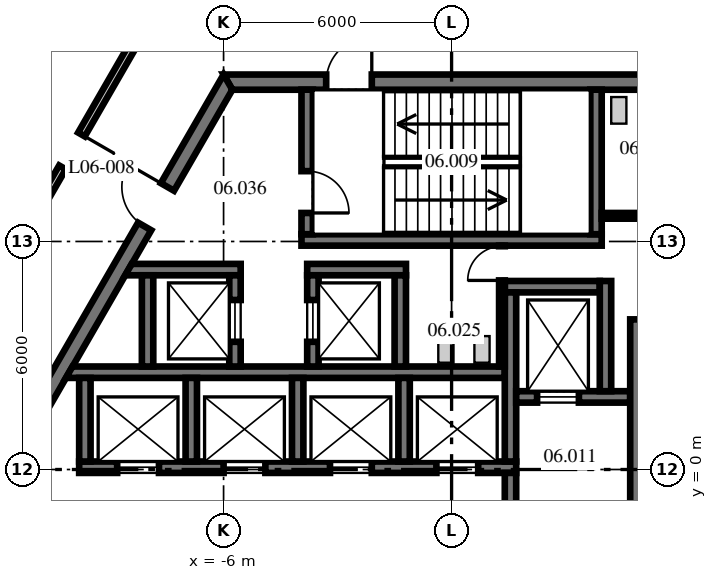
"""IFC4 building model, lengths in metres.
Left out: names, types, materials, properties, quantities, classifications, styles, units other than length and angle.
Written with IfcOpenShell. Run it as: python <this file> out.ifc"""

import sys

from ifc_helpers import new_model, si_unit, direction, frame, frame_2d, origin, place, context, subcontext, project, spatial, polyline, rectangle, outline, extrude, source, transform, mapped, element, fill, save


model = new_model("IFC4")
c1 = context("Model", 3, precision=1e-05, world=origin(), true_north=direction((0.0, 1.0)))
c2 = subcontext(c1, "Body", "Model", "MODEL_VIEW")
j1 = project(units=[si_unit("LENGTHUNIT", "METRE"), si_unit("PLANEANGLEUNIT", "RADIAN")], contexts=[c1])
p1 = place(None, origin())
s1 = spatial("IfcSite", under=j1, at=p1, CompositionType="ELEMENT")
p2 = place(p1, origin())
s2 = spatial("IfcBuilding", under=s1, at=p2, CompositionType="ELEMENT")
p3 = place(p2, frame((0.0, 0.0, 28.9)))
s3 = spatial("IfcBuildingStorey", under=s2, at=p3, CompositionType="ELEMENT", Elevation=28.9)
m1 = source(origin(), c2, "Body", "SweptSolid", [
    extrude(outline(polyline([(-0.115, -0.2), (11.885, -0.2), (11.654, 0.2), (0.115, 0.2), (-0.115, -0.2)])), origin(), (0.0, 0.0, 1.0), 4.1),
])
p4 = place(p3, frame((5.885, 10.192, 0.0), z_axis=(0.0, 0.0, 1.0), x_axis=(-1.0, 0.0, 0.0)))
e1 = element("IfcWall", 1, at=p4, inside=s3, PredefinedType="SHEAR", context=c2, shape_type="MappedRepresentation", body=[
    mapped(m1, transform((0.0, 0.0, 0.0), scale=1.0)),
])
p5 = place(p4, frame((7.985, 0.0, 0.0)))
e2 = element("IfcOpeningElement", 2, at=p5, cuts=e1, PredefinedType="OPENING", context=c2, shape_type="SweptSolid", body=[
    extrude(rectangle(XDim=1.2, YDim=2.1, at=frame_2d((0.6, 1.05))), frame((0.0, 0.21, 0.0), z_axis=(0.0, -1.0, 0.0), x_axis=(1.0, 0.0, 0.0)), (0.0, 0.0, 1.0), 0.42),
])
p6 = place(p3, frame((-5.885, 10.192, 0.0), z_axis=(0.0, 0.0, 1.0), x_axis=(-0.499996592174, -0.866027371285, 0.0)))
e3 = element("IfcWall", 3, at=p6, inside=s3, PredefinedType="SHEAR", context=c2, shape_type="MappedRepresentation", body=[
    mapped(m1, transform((0.0, 0.0, 0.0), scale=1.0)),
])
p7 = place(p6, frame((3.185, 0.0, 0.0)))
e4 = element("IfcOpeningElement", 4, at=p7, cuts=e3, PredefinedType="OPENING", context=c2, shape_type="SweptSolid", body=[
    extrude(rectangle(XDim=1.2, YDim=2.1, at=frame_2d((0.6, 1.05))), frame((0.0, 0.21, 0.0), z_axis=(0.0, -1.0, 0.0), x_axis=(1.0, 0.0, 0.0)), (0.0, 0.0, 1.0), 0.42),
])
p8 = place(p3, frame((-11.769, 0.0, 0.0), z_axis=(0.0, 0.0, 1.0), x_axis=(0.499996592174, -0.866027371285, 0.0)))
e5 = element("IfcWall", 5, at=p8, inside=s3, PredefinedType="SHEAR", context=c2, shape_type="MappedRepresentation", body=[
    mapped(m1, transform((0.0, 0.0, 0.0), scale=1.0)),
])
p9 = place(p8, frame((1.405, 0.0, 0.0)))
e6 = element("IfcOpeningElement", 6, at=p9, cuts=e5, PredefinedType="OPENING", context=c2, shape_type="SweptSolid", body=[
    extrude(rectangle(XDim=1.8, YDim=2.1, at=frame_2d((0.9, 1.05))), frame((0.0, 0.21, 0.0), z_axis=(0.0, -1.0, 0.0), x_axis=(1.0, 0.0, 0.0)), (0.0, 0.0, 1.0), 0.42),
])
p10 = place(p8, frame((7.915, 0.0, 0.0)))
e7 = element("IfcOpeningElement", 7, at=p10, cuts=e5, PredefinedType="OPENING", context=c2, shape_type="SweptSolid", body=[
    extrude(rectangle(XDim=1.2, YDim=2.1, at=frame_2d((0.6, 1.05))), frame((0.0, 0.21, 0.0), z_axis=(0.0, -1.0, 0.0), x_axis=(1.0, 0.0, 0.0)), (0.0, 0.0, 1.0), 0.42),
])
m2 = source(origin(), c2, "Body", "SweptSolid", [
    extrude(rectangle(XDim=11.5, YDim=0.3, at=frame_2d((5.75, 0.0))), origin(), (0.0, 0.0, 1.0), 4.1),
])
p11 = place(p3, frame((-9.8, 0.06, 0.0), z_axis=(0.0, 0.0, 1.0), x_axis=(1.0, 0.0, 0.0)))
e8 = element("IfcWall", 8, at=p11, inside=s3, PredefinedType="SHEAR", context=c2, shape_type="MappedRepresentation", body=[
    mapped(m2, transform((0.0, 0.0, 0.0), scale=1.0)),
])
p12 = place(p11, frame((1.0, 0.0, 0.0)))
e9 = element("IfcOpeningElement", 9, at=p12, cuts=e8, PredefinedType="OPENING", context=c2, shape_type="SweptSolid", body=[
    extrude(rectangle(XDim=1.1, YDim=2.1, at=frame_2d((0.55, 1.05))), frame((0.0, 0.16, 0.0), z_axis=(0.0, -1.0, 0.0), x_axis=(1.0, 0.0, 0.0)), (0.0, 0.0, 1.0), 0.32),
])
p13 = place(p11, frame((3.8, 0.0, 0.0)))
e10 = element("IfcOpeningElement", 10, at=p13, cuts=e8, PredefinedType="OPENING", context=c2, shape_type="SweptSolid", body=[
    extrude(rectangle(XDim=1.1, YDim=2.1, at=frame_2d((0.55, 1.05))), frame((0.0, 0.16, 0.0), z_axis=(0.0, -1.0, 0.0), x_axis=(1.0, 0.0, 0.0)), (0.0, 0.0, 1.0), 0.32),
])
p14 = place(p11, frame((6.6, 0.0, 0.0)))
e11 = element("IfcOpeningElement", 11, at=p14, cuts=e8, PredefinedType="OPENING", context=c2, shape_type="SweptSolid", body=[
    extrude(rectangle(XDim=1.1, YDim=2.1, at=frame_2d((0.55, 1.05))), frame((0.0, 0.16, 0.0), z_axis=(0.0, -1.0, 0.0), x_axis=(1.0, 0.0, 0.0)), (0.0, 0.0, 1.0), 0.32),
])
p15 = place(p11, frame((9.4, 0.0, 0.0)))
e12 = element("IfcOpeningElement", 12, at=p15, cuts=e8, PredefinedType="OPENING", context=c2, shape_type="SweptSolid", body=[
    extrude(rectangle(XDim=1.1, YDim=2.1, at=frame_2d((0.55, 1.05))), frame((0.0, 0.16, 0.0), z_axis=(0.0, -1.0, 0.0), x_axis=(1.0, 0.0, 0.0)), (0.0, 0.0, 1.0), 0.32),
])
m3 = source(origin(), c2, "Body", "SweptSolid", [
    extrude(outline(polyline([(11.2, -0.15), (-0.349, -0.15), (-0.176, 0.15), (11.2, 0.15), (11.2, -0.15)])), origin(), (0.0, 0.0, 1.0), 4.1),
])
p16 = place(p3, frame((-9.8, 2.56, 0.0), z_axis=(0.0, 0.0, 1.0), x_axis=(1.0, 0.0, 0.0)))
e13 = element("IfcWall", 13, at=p16, inside=s3, PredefinedType="SHEAR", context=c2, shape_type="MappedRepresentation", body=[
    mapped(m3, transform((0.0, 0.0, 0.0), scale=1.0)),
])
m4 = source(origin(), c2, "Body", "SweptSolid", [
    extrude(rectangle(XDim=2.5, YDim=0.3, at=frame_2d((1.25, 0.0))), origin(), (0.0, 0.0, 1.0), 4.1),
])
p17 = place(p3, frame((1.4, 4.81, 0.0), z_axis=(0.0, 0.0, 1.0), x_axis=(1.0, 0.0, 0.0)))
e14 = element("IfcWall", 14, at=p17, inside=s3, PredefinedType="SHEAR", context=c2, shape_type="MappedRepresentation", body=[
    mapped(m4, transform((0.0, 0.0, 0.0), scale=1.0)),
])
m5 = source(origin(), c2, "Body", "SweptSolid", [
    extrude(rectangle(XDim=4.45, YDim=0.3, at=frame_2d((2.225, 0.0))), origin(), (0.0, 0.0, 1.0), 4.1),
])
p18 = place(p3, frame((1.55, 0.21, 0.0), z_axis=(0.0, 0.0, 1.0), x_axis=(0.0, 1.0, 0.0)))
e15 = element("IfcWall", 15, at=p18, inside=s3, PredefinedType="SHEAR", context=c2, shape_type="MappedRepresentation", body=[
    mapped(m5, transform((0.0, 0.0, 0.0), scale=1.0)),
])
m6 = source(origin(), c2, "Body", "SweptSolid", [
    extrude(rectangle(XDim=3.0, YDim=0.3, at=frame_2d((1.5, 0.0))), origin(), (0.0, 0.0, 1.0), 4.1),
])
p19 = place(p3, frame((1.7, 1.91, 0.0), z_axis=(0.0, 0.0, 1.0), x_axis=(1.0, 0.0, 0.0)))
e16 = element("IfcWall", 16, at=p19, inside=s3, PredefinedType="SHEAR", context=c2, shape_type="MappedRepresentation", body=[
    mapped(m6, transform((0.0, 0.0, 0.0), scale=1.0)),
])
p20 = place(p19, frame((0.55, 0.0, 0.0)))
e17 = element("IfcOpeningElement", 17, at=p20, cuts=e16, PredefinedType="OPENING", context=c2, shape_type="SweptSolid", body=[
    extrude(rectangle(XDim=1.1, YDim=2.1, at=frame_2d((0.55, 1.05))), frame((0.0, 0.16, 0.0), z_axis=(0.0, -1.0, 0.0), x_axis=(1.0, 0.0, 0.0)), (0.0, 0.0, 1.0), 0.32),
])
m7 = source(origin(), c2, "Body", "SweptSolid", [
    extrude(rectangle(XDim=2.9, YDim=0.3, at=frame_2d((1.45, 0.0))), origin(), (0.0, 0.0, 1.0), 4.1),
])
p21 = place(p3, frame((4.05, 2.06, 0.0), z_axis=(0.0, 0.0, 1.0), x_axis=(0.0, 1.0, 0.0)))
e18 = element("IfcWall", 18, at=p21, inside=s3, PredefinedType="SHEAR", context=c2, shape_type="MappedRepresentation", body=[
    mapped(m7, transform((0.0, 0.0, 0.0), scale=1.0)),
])
m8 = source(origin(), c2, "Body", "SweptSolid", [
    extrude(rectangle(XDim=2.2, YDim=0.3, at=frame_2d((1.1, 0.0))), origin(), (0.0, 0.0, 1.0), 4.1),
])
p22 = place(p3, frame((-9.65, 0.21, 0.0), z_axis=(0.0, 0.0, 1.0), x_axis=(0.0, 1.0, 0.0)))
e19 = element("IfcWall", 19, at=p22, inside=s3, PredefinedType="SHEAR", context=c2, shape_type="MappedRepresentation", body=[
    mapped(m8, transform((0.0, 0.0, 0.0), scale=1.0)),
])
p23 = place(p3, frame((1.55, -3.09, 0.0), z_axis=(0.0, 0.0, 1.0), x_axis=(0.0, 1.0, 0.0)))
e20 = element("IfcWall", 20, at=p23, inside=s3, PredefinedType="SHEAR", context=c2, shape_type="MappedRepresentation", body=[
    mapped(m6, transform((0.0, 0.0, 0.0), scale=1.0)),
])
p24 = place(p23, frame((0.9, 0.0, 0.0)))
e21 = element("IfcOpeningElement", 21, at=p24, cuts=e20, PredefinedType="OPENING", context=c2, shape_type="SweptSolid", body=[
    extrude(rectangle(XDim=1.2, YDim=2.1, at=frame_2d((0.6, 1.05))), frame((0.0, 0.16, 0.0), z_axis=(0.0, -1.0, 0.0), x_axis=(1.0, 0.0, 0.0)), (0.0, 0.0, 1.0), 0.32),
])
m9 = source(origin(), c2, "Body", "SweptSolid", [
    extrude(outline(polyline([(-0.15, -0.15), (9.99, -0.15), (9.99, 0.15), (0.15, 0.15), (-0.15, -0.15)])), origin(), (0.0, 0.0, 1.0), 4.1),
])
p25 = place(p3, frame((4.85, -6.04, 0.0), z_axis=(0.0, 0.0, 1.0), x_axis=(0.0, 1.0, 0.0)))
e22 = element("IfcWall", 22, at=p25, inside=s3, PredefinedType="SHEAR", context=c2, shape_type="MappedRepresentation", body=[
    mapped(m9, transform((0.0, 0.0, 0.0), scale=1.0)),
])
p26 = place(p25, frame((3.19, 0.0, 0.0)))
e23 = element("IfcOpeningElement", 23, at=p26, cuts=e22, PredefinedType="OPENING", context=c2, shape_type="SweptSolid", body=[
    extrude(rectangle(XDim=1.1, YDim=2.1, at=frame_2d((0.55, 1.05))), frame((0.0, 0.16, 0.0), z_axis=(0.0, -1.0, 0.0), x_axis=(1.0, 0.0, 0.0)), (0.0, 0.0, 1.0), 0.32),
])
m10 = source(origin(), c2, "Body", "SweptSolid", [
    extrude(rectangle(XDim=7.9, YDim=0.3, at=frame_2d((3.95, 0.0))), origin(), (0.0, 0.0, 1.0), 4.1),
])
p27 = place(p3, frame((-3.95, 6.04, 0.0), z_axis=(0.0, 0.0, 1.0), x_axis=(1.0, 0.0, 0.0)))
e24 = element("IfcWall", 24, at=p27, inside=s3, PredefinedType="SHEAR", context=c2, shape_type="MappedRepresentation", body=[
    mapped(m10, transform((0.0, 0.0, 0.0), scale=1.0)),
])
m11 = source(origin(), c2, "Body", "SweptSolid", [
    extrude(outline(polyline([(0.0, -0.15), (0.0, 0.15), (3.804, 0.15), (3.804, -0.15), (0.0, -0.15)])), origin(), (0.0, 0.0, 1.0), 4.1),
])
p28 = place(p3, frame((-3.8, 6.19, 0.0), z_axis=(0.0, 0.0, 1.0), x_axis=(0.0, 1.0, 0.0)))
e25 = element("IfcWall", 25, at=p28, inside=s3, PredefinedType="SHEAR", context=c2, shape_type="MappedRepresentation", body=[
    mapped(m11, transform((0.0, 0.0, 0.0), scale=1.0)),
])
p29 = place(p28, frame((0.56, 0.0, 0.0)))
e26 = element("IfcOpeningElement", 26, at=p29, cuts=e25, PredefinedType="OPENING", context=c2, shape_type="SweptSolid", body=[
    extrude(rectangle(XDim=1.1, YDim=2.1, at=frame_2d((0.55, 1.05))), frame((0.0, 0.16, 0.0), z_axis=(0.0, -1.0, 0.0), x_axis=(1.0, 0.0, 0.0)), (0.0, 0.0, 1.0), 0.32),
])
p30 = place(p3, frame((3.8, 6.19, 0.0), z_axis=(0.0, 0.0, 1.0), x_axis=(0.0, 1.0, 0.0)))
e27 = element("IfcWall", 27, at=p30, inside=s3, PredefinedType="SHEAR", context=c2, shape_type="MappedRepresentation", body=[
    mapped(m11, transform((0.0, 0.0, 0.0), scale=1.0)),
])
m12 = source(origin(), c2, "Body", "SweptSolid", [
    extrude(outline(polyline([(2.6, -0.15), (-0.44, -0.15), (-0.267, 0.15), (2.6, 0.15), (2.6, -0.15)])), origin(), (0.0, 0.0, 1.0), 4.1),
])
p31 = place(p3, frame((-8.15, 5.26, 0.0), z_axis=(0.0, 0.0, 1.0), x_axis=(1.0, 0.0, 0.0)))
e28 = element("IfcWall", 28, at=p31, inside=s3, PredefinedType="SHEAR", context=c2, shape_type="MappedRepresentation", body=[
    mapped(m12, transform((0.0, 0.0, 0.0), scale=1.0)),
])
m13 = source(origin(), c2, "Body", "SweptSolid", [
    extrude(rectangle(XDim=2.4, YDim=0.3, at=frame_2d((1.2, 0.0))), origin(), (0.0, 0.0, 1.0), 4.1),
])
p32 = place(p3, frame((-8.0, 2.71, 0.0), z_axis=(0.0, 0.0, 1.0), x_axis=(0.0, 1.0, 0.0)))
e29 = element("IfcWall", 29, at=p32, inside=s3, PredefinedType="SHEAR", context=c2, shape_type="MappedRepresentation", body=[
    mapped(m13, transform((0.0, 0.0, 0.0), scale=1.0)),
])
p33 = place(p3, frame((-5.7, 2.71, 0.0), z_axis=(0.0, 0.0, 1.0), x_axis=(0.0, 1.0, 0.0)))
e30 = element("IfcWall", 30, at=p33, inside=s3, PredefinedType="SHEAR", context=c2, shape_type="MappedRepresentation", body=[
    mapped(m13, transform((0.0, 0.0, 0.0), scale=1.0)),
])
p34 = place(p33, frame((0.65, 0.0, 0.0)))
e31 = element("IfcOpeningElement", 31, at=p34, cuts=e30, PredefinedType="OPENING", context=c2, shape_type="SweptSolid", body=[
    extrude(rectangle(XDim=1.1, YDim=2.1, at=frame_2d((0.55, 1.05))), frame((0.0, 0.16, 0.0), z_axis=(0.0, -1.0, 0.0), x_axis=(1.0, 0.0, 0.0)), (0.0, 0.0, 1.0), 0.32),
])
m14 = source(origin(), c2, "Body", "SweptSolid", [
    extrude(rectangle(XDim=2.6, YDim=0.3, at=frame_2d((1.3, 0.0))), origin(), (0.0, 0.0, 1.0), 4.1),
])
p35 = place(p3, frame((-3.8, 5.26, 0.0), z_axis=(0.0, 0.0, 1.0), x_axis=(1.0, 0.0, 0.0)))
e32 = element("IfcWall", 32, at=p35, inside=s3, PredefinedType="SHEAR", context=c2, shape_type="MappedRepresentation", body=[
    mapped(m14, transform((0.0, 0.0, 0.0), scale=1.0)),
])
p36 = place(p3, frame((-3.65, 2.71, 0.0), z_axis=(0.0, 0.0, 1.0), x_axis=(0.0, 1.0, 0.0)))
e33 = element("IfcWall", 33, at=p36, inside=s3, PredefinedType="SHEAR", context=c2, shape_type="MappedRepresentation", body=[
    mapped(m13, transform((0.0, 0.0, 0.0), scale=1.0)),
])
p37 = place(p36, frame((0.65, 0.0, 0.0)))
e34 = element("IfcOpeningElement", 34, at=p37, cuts=e33, PredefinedType="OPENING", context=c2, shape_type="SweptSolid", body=[
    extrude(rectangle(XDim=1.1, YDim=2.1, at=frame_2d((0.55, 1.05))), frame((0.0, 0.16, 0.0), z_axis=(0.0, -1.0, 0.0), x_axis=(1.0, 0.0, 0.0)), (0.0, 0.0, 1.0), 0.32),
])
p38 = place(p3, frame((-1.35, 2.71, 0.0), z_axis=(0.0, 0.0, 1.0), x_axis=(0.0, 1.0, 0.0)))
e35 = element("IfcWall", 35, at=p38, inside=s3, PredefinedType="SHEAR", context=c2, shape_type="MappedRepresentation", body=[
    mapped(m13, transform((0.0, 0.0, 0.0), scale=1.0)),
])
m15 = source(origin(), c2, "Body", "SweptSolid", [
    extrude(rectangle(XDim=3.18, YDim=0.15, at=frame_2d((1.59, 0.0))), origin(), (0.0, 0.0, 1.0), 4.1),
])
p39 = place(p3, frame((1.325, 2.71, 0.0), z_axis=(0.0, 0.0, 1.0), x_axis=(0.0, 1.0, 0.0)))
e36 = element("IfcWall", 36, at=p39, inside=s3, PredefinedType="PARTITIONING", context=c2, shape_type="MappedRepresentation", body=[
    mapped(m15, transform((0.0, 0.0, 0.0), scale=1.0)),
])
p40 = place(p39, frame((2.265, 0.0, 0.0)))
e37 = element("IfcOpeningElement", 37, at=p40, cuts=e36, PredefinedType="OPENING", context=c2, shape_type="SweptSolid", body=[
    extrude(rectangle(XDim=0.9, YDim=2.1, at=frame_2d((0.45, 1.05))), frame((0.0, 0.085, 0.0), z_axis=(0.0, -1.0, 0.0), x_axis=(1.0, 0.0, 0.0)), (0.0, 0.0, 1.0), 0.17),
])
m16 = source(origin(), c2, "Body", "SweptSolid", [
    extrude(outline(polyline([(0.0, -0.075), (0.0, 0.075), (3.693, 0.075), (3.78, -0.075), (0.0, -0.075)])), origin(), (0.0, 0.0, 1.0), 4.1),
])
p41 = place(p3, frame((3.95, 6.675, 0.0), z_axis=(0.0, 0.0, 1.0), x_axis=(1.0, 0.0, 0.0)))
e38 = element("IfcWall", 38, at=p41, inside=s3, PredefinedType="PARTITIONING", context=c2, shape_type="MappedRepresentation", body=[
    mapped(m16, transform((0.0, 0.0, 0.0), scale=1.0)),
])
p42 = place(p41, frame((1.6, 0.0, 0.0)))
e39 = element("IfcOpeningElement", 39, at=p42, cuts=e38, PredefinedType="OPENING", context=c2, shape_type="SweptSolid", body=[
    extrude(rectangle(XDim=0.9, YDim=2.1, at=frame_2d((0.45, 1.05))), frame((0.0, 0.085, 0.0), z_axis=(0.0, -1.0, 0.0), x_axis=(1.0, 0.0, 0.0)), (0.0, 0.0, 1.0), 0.17),
])
for number, where, z_axis, x_axis in (
    (40, (-6.85, 0.21, 0.0), (0.0, 0.0, 1.0), (0.0, 1.0, 0.0)),
    (41, (-4.05, 0.21, 0.0), (0.0, 0.0, 1.0), (0.0, 1.0, 0.0)),
    (42, (-1.25, 0.21, 0.0), (0.0, 0.0, 1.0), (0.0, 1.0, 0.0)),
):
    element("IfcWall", number, at=place(p3, frame(where, z_axis=z_axis, x_axis=x_axis)), inside=s3, PredefinedType="SHEAR", context=c2, shape_type="MappedRepresentation", body=[
        mapped(m8, transform((0.0, 0.0, 0.0), scale=1.0)),
    ])
m17 = source(origin(), c2, "Body", "SweptSolid", [
    extrude(rectangle(XDim=14.759, YDim=0.2, at=frame_2d((7.379, 0.0))), origin(), (0.0, 0.0, 1.0), 4.1),
])
p43 = place(p3, frame((-14.794, 0.061, 0.0), z_axis=(0.0, 0.0, 1.0), x_axis=(0.49999260588, 0.86602967274, 0.0)))
e43 = element("IfcWall", 43, at=p43, inside=s3, PredefinedType="PARTITIONING", context=c2, shape_type="MappedRepresentation", body=[
    mapped(m17, transform((0.0, 0.0, 0.0), scale=1.0)),
])
p44 = place(p43, frame((9.109, 0.0, 0.0)))
e44 = element("IfcOpeningElement", 44, at=p44, cuts=e43, PredefinedType="OPENING", context=c2, shape_type="SweptSolid", body=[
    extrude(rectangle(XDim=1.0, YDim=2.1, at=frame_2d((0.5, 1.05))), frame((0.0, 0.11, 0.0), z_axis=(0.0, -1.0, 0.0), x_axis=(1.0, 0.0, 0.0)), (0.0, 0.0, 1.0), 0.22),
])
p45 = place(p5, frame((1.2, 0.0, 0.0), z_axis=(0.0, 0.0, 1.0), x_axis=(-1.0, 0.0, 0.0)))
e45 = element("IfcDoor", 45, at=p45, inside=s3, OperationType="SINGLE_SWING_RIGHT", PredefinedType="DOOR", context=c2, shape_type="SweptSolid", body=[
    extrude(rectangle(XDim=1.2, YDim=2.1, at=frame_2d((0.6, 1.05))), frame((0.0, 0.025, 0.0), z_axis=(0.0, -1.0, 0.0), x_axis=(1.0, 0.0, 0.0)), (0.0, 0.0, 1.0), 0.05),
])
fill(e2, e45)
p46 = place(p7, frame((1.2, 0.0, 0.0), z_axis=(0.0, 0.0, 1.0), x_axis=(-1.0, 0.0, 0.0)))
e46 = element("IfcDoor", 46, at=p46, inside=s3, OperationType="SINGLE_SWING_RIGHT", PredefinedType="DOOR", context=c2, shape_type="SweptSolid", body=[
    extrude(rectangle(XDim=1.2, YDim=2.1, at=frame_2d((0.6, 1.05))), frame((0.0, 0.025, 0.0), z_axis=(0.0, -1.0, 0.0), x_axis=(1.0, 0.0, 0.0)), (0.0, 0.0, 1.0), 0.05),
])
fill(e4, e46)
p47 = place(p29, frame((1.1, 0.0, 0.0), z_axis=(0.0, 0.0, 1.0), x_axis=(-1.0, 0.0, 0.0)))
e47 = element("IfcDoor", 47, at=p47, inside=s3, OperationType="SINGLE_SWING_RIGHT", PredefinedType="DOOR", context=c2, shape_type="SweptSolid", body=[
    extrude(rectangle(XDim=1.1, YDim=2.1, at=frame_2d((0.55, 1.05))), frame((0.0, 0.025, 0.0), z_axis=(0.0, -1.0, 0.0), x_axis=(1.0, 0.0, 0.0)), (0.0, 0.0, 1.0), 0.05),
])
fill(e26, e47)
p48 = place(p40, origin())
e48 = element("IfcDoor", 48, at=p48, inside=s3, OperationType="SINGLE_SWING_LEFT", PredefinedType="DOOR", context=c2, shape_type="SweptSolid", body=[
    extrude(rectangle(XDim=0.9, YDim=2.1, at=frame_2d((0.45, 1.05))), frame((0.0, 0.025, 0.0), z_axis=(0.0, -1.0, 0.0), x_axis=(1.0, 0.0, 0.0)), (0.0, 0.0, 1.0), 0.05),
])
fill(e37, e48)
p49 = place(p12, origin())
e49 = element("IfcDoor", 49, at=p49, inside=s3, OperationType="DOUBLE_DOOR_SLIDING", PredefinedType="DOOR", context=c2, shape_type="SweptSolid", body=[
    extrude(rectangle(XDim=1.1, YDim=2.1, at=frame_2d((0.55, 1.05))), frame((0.0, 0.025, 0.0), z_axis=(0.0, -1.0, 0.0), x_axis=(1.0, 0.0, 0.0)), (0.0, 0.0, 1.0), 0.05),
])
fill(e9, e49)
p50 = place(p13, origin())
e50 = element("IfcDoor", 50, at=p50, inside=s3, OperationType="DOUBLE_DOOR_SLIDING", PredefinedType="DOOR", context=c2, shape_type="SweptSolid", body=[
    extrude(rectangle(XDim=1.1, YDim=2.1, at=frame_2d((0.55, 1.05))), frame((0.0, 0.025, 0.0), z_axis=(0.0, -1.0, 0.0), x_axis=(1.0, 0.0, 0.0)), (0.0, 0.0, 1.0), 0.05),
])
fill(e10, e50)
p51 = place(p14, origin())
e51 = element("IfcDoor", 51, at=p51, inside=s3, OperationType="DOUBLE_DOOR_SLIDING", PredefinedType="DOOR", context=c2, shape_type="SweptSolid", body=[
    extrude(rectangle(XDim=1.1, YDim=2.1, at=frame_2d((0.55, 1.05))), frame((0.0, 0.025, 0.0), z_axis=(0.0, -1.0, 0.0), x_axis=(1.0, 0.0, 0.0)), (0.0, 0.0, 1.0), 0.05),
])
fill(e11, e51)
p52 = place(p15, origin())
e52 = element("IfcDoor", 52, at=p52, inside=s3, OperationType="DOUBLE_DOOR_SLIDING", PredefinedType="DOOR", context=c2, shape_type="SweptSolid", body=[
    extrude(rectangle(XDim=1.1, YDim=2.1, at=frame_2d((0.55, 1.05))), frame((0.0, 0.025, 0.0), z_axis=(0.0, -1.0, 0.0), x_axis=(1.0, 0.0, 0.0)), (0.0, 0.0, 1.0), 0.05),
])
fill(e12, e52)
p53 = place(p20, origin())
e53 = element("IfcDoor", 53, at=p53, inside=s3, OperationType="DOUBLE_DOOR_SLIDING", PredefinedType="DOOR", context=c2, shape_type="SweptSolid", body=[
    extrude(rectangle(XDim=1.1, YDim=2.1, at=frame_2d((0.55, 1.05))), frame((0.0, 0.025, 0.0), z_axis=(0.0, -1.0, 0.0), x_axis=(1.0, 0.0, 0.0)), (0.0, 0.0, 1.0), 0.05),
])
fill(e17, e53)
p54 = place(p34, origin())
e54 = element("IfcDoor", 54, at=p54, inside=s3, OperationType="DOUBLE_DOOR_SLIDING", PredefinedType="DOOR", context=c2, shape_type="SweptSolid", body=[
    extrude(rectangle(XDim=1.1, YDim=2.1, at=frame_2d((0.55, 1.05))), frame((0.0, 0.025, 0.0), z_axis=(0.0, -1.0, 0.0), x_axis=(1.0, 0.0, 0.0)), (0.0, 0.0, 1.0), 0.05),
])
fill(e31, e54)
p55 = place(p37, origin())
e55 = element("IfcDoor", 55, at=p55, inside=s3, OperationType="DOUBLE_DOOR_SLIDING", PredefinedType="DOOR", context=c2, shape_type="SweptSolid", body=[
    extrude(rectangle(XDim=1.1, YDim=2.1, at=frame_2d((0.55, 1.05))), frame((0.0, 0.025, 0.0), z_axis=(0.0, -1.0, 0.0), x_axis=(1.0, 0.0, 0.0)), (0.0, 0.0, 1.0), 0.05),
])
fill(e34, e55)
p56 = place(p44, origin())
e56 = element("IfcDoor", 56, at=p56, inside=s3, OperationType="SINGLE_SWING_RIGHT", PredefinedType="DOOR", context=c2, shape_type="SweptSolid", body=[
    extrude(rectangle(XDim=1.0, YDim=2.1, at=frame_2d((0.5, 1.05))), frame((0.0, 0.025, 0.0), z_axis=(0.0, -1.0, 0.0), x_axis=(1.0, 0.0, 0.0)), (0.0, 0.0, 1.0), 0.05),
])
fill(e44, e56)
save(model, sys.argv[1])
